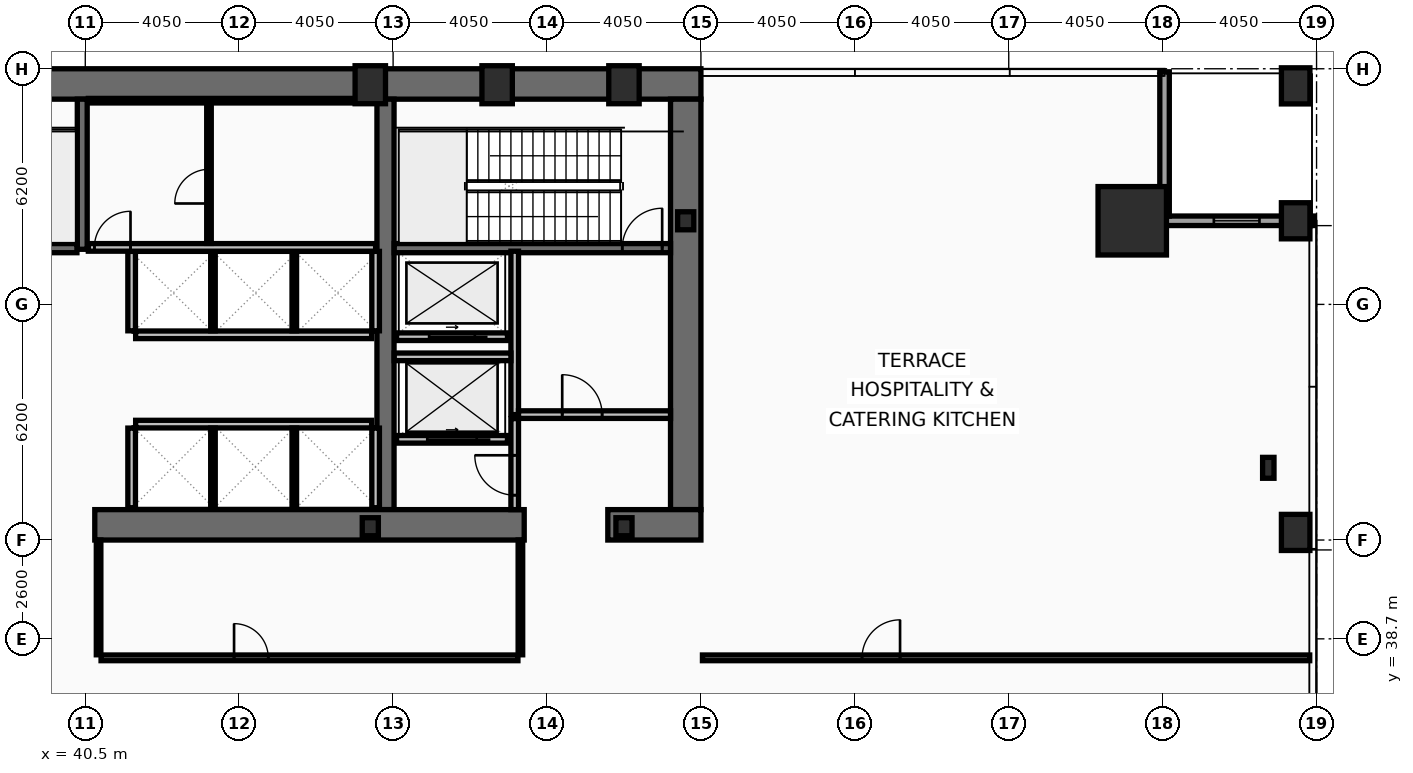
"""IFC4 building model, lengths in metres.
Left out: names, types, materials, properties, quantities, classifications, styles, units other than length and angle.
Written with IfcOpenShell. Run it as: python <this file> out.ifc"""

import sys

from ifc_helpers import new_model, si_unit, direction, frame, frame_2d, origin, origin_2d, place, context, subcontext, project, spatial, rectangle, hollow_rectangle, i_section, extrude, element, fill, save


model = new_model("IFC4")
c1 = context("Model", 3, precision=1e-05, world=origin(), true_north=direction((0.0, 1.0)))
c2 = subcontext(c1, "Body", "Model", "MODEL_VIEW")
j1 = project(units=[si_unit("LENGTHUNIT", "METRE"), si_unit("PLANEANGLEUNIT", "RADIAN")], contexts=[c1])
p1 = place(None, origin())
s1 = spatial("IfcSite", under=j1, at=p1, CompositionType="ELEMENT")
p2 = place(p1, origin())
s2 = spatial("IfcBuilding", under=s1, at=p2, CompositionType="ELEMENT")
p3 = place(p2, frame((0.0, 0.0, 10.4)))
s3 = spatial("IfcBuildingStorey", under=s2, at=p3, CompositionType="ELEMENT", Elevation=10.4)
p4 = place(p3, frame((16.2, 53.3, 0.0), z_axis=(0.0, 0.0, 1.0), x_axis=(1.0, 0.0, 0.0)))
e1 = element("IfcWall", 1, at=p4, inside=s3, PredefinedType="SHEAR", context=c2, shape_type="SweptSolid", body=[
    extrude(rectangle(XDim=40.5, YDim=0.8, at=frame_2d((20.25, 0.0))), origin(), (0.0, 0.0, 1.0), 4.8),
])
p5 = place(p3, frame((56.3, 52.9, 0.0), z_axis=(0.0, 0.0, 1.0), x_axis=(0.0, -1.0, 0.0)))
e2 = element("IfcWall", 2, at=p5, inside=s3, PredefinedType="SHEAR", context=c2, shape_type="SweptSolid", body=[
    extrude(rectangle(XDim=10.8, YDim=0.8, at=frame_2d((5.4, 0.0))), origin(), (0.0, 0.0, 1.0), 4.8),
])
p6 = place(p3, frame((48.4, 42.1, 0.0), z_axis=(0.0, 0.0, 1.0), x_axis=(0.0, 1.0, 0.0)))
e3 = element("IfcWall", 3, at=p6, inside=s3, PredefinedType="SHEAR", context=c2, shape_type="SweptSolid", body=[
    extrude(rectangle(XDim=10.8, YDim=0.45, at=frame_2d((5.4, 0.0))), origin(), (0.0, 0.0, 1.0), 4.8),
])
p7 = place(p3, frame((52.05, 41.7, 0.0), z_axis=(0.0, 0.0, 1.0), x_axis=(-1.0, 0.0, 0.0)))
e4 = element("IfcWall", 4, at=p7, inside=s3, PredefinedType="SHEAR", context=c2, shape_type="SweptSolid", body=[
    extrude(rectangle(XDim=11.3, YDim=0.8, at=frame_2d((5.65, 0.0))), origin(), (0.0, 0.0, 1.0), 4.8),
])
p8 = place(p3, frame((56.7, 41.7, 0.0), z_axis=(0.0, 0.0, 1.0), x_axis=(-1.0, 0.0, 0.0)))
e5 = element("IfcWall", 5, at=p8, inside=s3, PredefinedType="SHEAR", context=c2, shape_type="SweptSolid", body=[
    extrude(rectangle(XDim=2.45, YDim=0.8, at=frame_2d((1.225, 0.0))), origin(), (0.0, 0.0, 1.0), 4.8),
])
p9 = place(p3, frame((40.42, 48.95, 0.0), z_axis=(0.0, 0.0, 1.0), x_axis=(0.0, 1.0, 0.0)))
e6 = element("IfcWall", 6, at=p9, inside=s3, PredefinedType="SHEAR", context=c2, shape_type="SweptSolid", body=[
    extrude(rectangle(XDim=3.95, YDim=0.26, at=frame_2d((1.975, 0.0))), origin(), (0.0, 0.0, 1.0), 4.8),
])
p10 = place(p3, frame((48.63, 48.98, 0.0), z_axis=(0.0, 0.0, 1.0), x_axis=(1.0, 0.0, 0.0)))
e7 = element("IfcWall", 7, at=p10, inside=s3, PredefinedType="SHEAR", context=c2, shape_type="SweptSolid", body=[
    extrude(rectangle(XDim=7.27, YDim=0.24, at=frame_2d((3.635, 0.0))), origin(), (0.0, 0.0, 1.0), 4.8),
])
p11 = place(p10, frame((6.0, 0.0, 0.0)))
e8 = element("IfcOpeningElement", 8, at=p11, cuts=e7, PredefinedType="OPENING", context=c2, shape_type="SweptSolid", body=[
    extrude(rectangle(XDim=1.05, YDim=2.15, at=frame_2d((0.525, 1.075))), frame((0.0, 0.13, 0.0), z_axis=(0.0, -1.0, 0.0), x_axis=(1.0, 0.0, 0.0)), (0.0, 0.0, 1.0), 0.26),
])
p12 = place(p3, frame((32.72, 48.98, 0.0), z_axis=(0.0, 0.0, 1.0), x_axis=(1.0, 0.0, 0.0)))
e9 = element("IfcWall", 9, at=p12, inside=s3, PredefinedType="SHEAR", context=c2, shape_type="SweptSolid", body=[
    extrude(rectangle(XDim=7.56, YDim=0.24, at=frame_2d((3.78, 0.0))), origin(), (0.0, 0.0, 1.0), 4.8),
])
p13 = place(p12, frame((0.22, 0.0, 0.0)))
e10 = element("IfcOpeningElement", 10, at=p13, cuts=e9, PredefinedType="OPENING", context=c2, shape_type="SweptSolid", body=[
    extrude(rectangle(XDim=1.05, YDim=2.15, at=frame_2d((0.525, 1.075))), frame((0.0, 0.13, 0.0), z_axis=(0.0, -1.0, 0.0), x_axis=(1.0, 0.0, 0.0)), (0.0, 0.0, 1.0), 0.26),
])
p14 = place(p3, frame((68.05, 49.7, 0.0), z_axis=(0.0, 0.0, 1.0), x_axis=(1.0, 0.0, 0.0)))
e11 = element("IfcColumn", 11, at=p14, inside=s3, PredefinedType="COLUMN", context=c2, shape_type="SweptSolid", body=[
    extrude(hollow_rectangle(XDim=1.8, YDim=1.8, WallThickness=0.08, at=origin_2d()), origin(), (0.0, 0.0, 1.0), 5.0),
])
for number, where, z_axis, x_axis in (
    (12, (48.0, 53.28, 0.0), (0.0, 0.0, 1.0), (1.0, 0.0, 0.0)),
    (13, (51.337, 53.28, 0.0), (0.0, 0.0, 1.0), (1.0, 0.0, 0.0)),
    (14, (54.675, 53.28, 0.0), (0.0, 0.0, 1.0), (1.0, 0.0, 0.0)),
):
    element("IfcColumn", number, at=place(p3, frame(where, z_axis=z_axis, x_axis=x_axis)), inside=s3, PredefinedType="COLUMN", context=c2, shape_type="SweptSolid", body=[
        extrude(hollow_rectangle(XDim=0.8, YDim=1.0, WallThickness=0.055, at=origin_2d()), origin(), (0.0, 0.0, 1.0), 5.0),
    ])
p15 = place(p3, frame((71.63, 43.2, 0.0), z_axis=(0.0, 0.0, 1.0), x_axis=(1.0, 0.0, 0.0)))
e15 = element("IfcColumn", 15, at=p15, inside=s3, PredefinedType="COLUMN", context=c2, shape_type="SweptSolid", body=[
    extrude(i_section(OverallWidth=0.3, OverallDepth=0.55, WebThickness=0.015, FlangeThickness=0.029, at=origin_2d()), origin(), (0.0, 0.0, 1.0), 5.0),
])
for number, where, z_axis, x_axis in (
    (16, (56.3, 49.7, 0.0), (0.0, 0.0, 1.0), (1.0, 0.0, 0.0)),
    (17, (48.0, 41.65, 0.0), (0.0, 0.0, 1.0), (1.0, 0.0, 0.0)),
    (18, (54.675, 41.65, 0.0), (0.0, 0.0, 1.0), (1.0, 0.0, 0.0)),
):
    element("IfcColumn", number, at=place(p3, frame(where, z_axis=z_axis, x_axis=x_axis)), inside=s3, PredefinedType="COLUMN", context=c2, shape_type="SweptSolid", body=[
        extrude(i_section(OverallWidth=0.424, OverallDepth=0.474, WebThickness=0.048, FlangeThickness=0.077, at=origin_2d()), origin(), (0.0, 0.0, 1.0), 5.0),
    ])
for number, where, z_axis, x_axis in (
    (19, (72.35, 49.7, 0.0), (0.0, 0.0, 1.0), (1.0, 0.0, 0.0)),
    (20, (72.35, 53.25, 0.0), (0.0, 0.0, 1.0), (1.0, 0.0, 0.0)),
    (21, (72.35, 41.5, 0.0), (0.0, 0.0, 1.0), (1.0, 0.0, 0.0)),
):
    element("IfcColumn", number, at=place(p3, frame(where, z_axis=z_axis, x_axis=x_axis)), inside=s3, PredefinedType="PILASTER", context=c2, shape_type="SweptSolid", body=[
        extrude(rectangle(XDim=0.75, YDim=0.95, at=origin_2d()), origin(), (0.0, 0.0, 1.0), 5.0),
    ])
p16 = place(p3, frame((68.775, 49.7, 0.0), z_axis=(0.0, 0.0, 1.0), x_axis=(1.0, 0.0, 0.0)))
e22 = element("IfcWall", 22, at=p16, inside=s3, PredefinedType="SOLIDWALL", context=c2, shape_type="SweptSolid", body=[
    extrude(rectangle(XDim=4.045, YDim=0.25, at=frame_2d((2.022, 0.0))), origin(), (0.0, 0.0, 1.0), 4.14),
])
p17 = place(p16, frame((1.423, 0.0, 0.9)))
e23 = element("IfcOpeningElement", 23, at=p17, cuts=e22, PredefinedType="OPENING", context=c2, shape_type="SweptSolid", body=[
    extrude(rectangle(XDim=1.2, YDim=2.8, at=frame_2d((0.6, 1.4))), frame((0.0, 0.135, 0.0), z_axis=(0.0, -1.0, 0.0), x_axis=(1.0, 0.0, 0.0)), (0.0, 0.0, 1.0), 0.27),
])
p18 = place(p3, frame((68.9, 53.62, 0.0), z_axis=(0.0, 0.0, 1.0), x_axis=(0.0, -1.0, 0.0)))
e24 = element("IfcWall", 24, at=p18, inside=s3, PredefinedType="SOLIDWALL", context=c2, shape_type="SweptSolid", body=[
    extrude(rectangle(XDim=3.795, YDim=0.25, at=frame_2d((1.897, 0.0))), origin(), (0.0, 0.0, 1.0), 4.14),
])
p19 = place(p3, frame((51.61, 43.95, 0.0), z_axis=(0.0, 0.0, 1.0), x_axis=(-1.0, 0.0, 0.0)))
e25 = element("IfcWall", 25, at=p19, inside=s3, PredefinedType="PARTITIONING", context=c2, shape_type="SweptSolid", body=[
    extrude(rectangle(XDim=2.92, YDim=0.2, at=frame_2d((1.46, 0.0))), origin(), (0.0, 0.0, 1.0), 4.8),
])
p20 = place(p19, frame((0.81, 0.0, 0.0)))
e26 = element("IfcOpeningElement", 26, at=p20, cuts=e25, PredefinedType="OPENING", context=c2, shape_type="SweptSolid", body=[
    extrude(rectangle(XDim=1.3, YDim=2.18, at=frame_2d((0.65, 1.09))), frame((0.0, 0.11, 0.0), z_axis=(0.0, -1.0, 0.0), x_axis=(1.0, 0.0, 0.0)), (0.0, 0.0, 1.0), 0.22),
])
p21 = place(p3, frame((51.61, 46.65, 0.0), z_axis=(0.0, 0.0, 1.0), x_axis=(-1.0, 0.0, 0.0)))
e27 = element("IfcWall", 27, at=p21, inside=s3, PredefinedType="PARTITIONING", context=c2, shape_type="SweptSolid", body=[
    extrude(rectangle(XDim=2.92, YDim=0.2, at=frame_2d((1.46, 0.0))), origin(), (0.0, 0.0, 1.0), 4.8),
])
p22 = place(p21, frame((0.86, 0.0, 0.0)))
e28 = element("IfcOpeningElement", 28, at=p22, cuts=e27, PredefinedType="OPENING", context=c2, shape_type="SweptSolid", body=[
    extrude(rectangle(XDim=1.2, YDim=2.18, at=frame_2d((0.6, 1.09))), frame((0.0, 0.11, 0.0), z_axis=(0.0, -1.0, 0.0), x_axis=(1.0, 0.0, 0.0)), (0.0, 0.0, 1.0), 0.22),
])
p23 = place(p3, frame((51.8, 44.6, 0.0), z_axis=(0.0, 0.0, 1.0), x_axis=(0.0, 1.0, 0.0)))
e29 = element("IfcWall", 29, at=p23, inside=s3, PredefinedType="PARTITIONING", context=c2, shape_type="SweptSolid", body=[
    extrude(rectangle(XDim=4.3, YDim=0.2, at=frame_2d((2.15, 0.0))), origin(), (0.0, 0.0, 1.0), 4.8),
])
p24 = place(p3, frame((51.9, 44.6, 0.0), z_axis=(0.0, 0.0, 1.0), x_axis=(1.0, 0.0, 0.0)))
e30 = element("IfcWall", 30, at=p24, inside=s3, PredefinedType="PARTITIONING", context=c2, shape_type="SweptSolid", body=[
    extrude(rectangle(XDim=4.0, YDim=0.2, at=frame_2d((2.0, 0.0))), origin(), (0.0, 0.0, 1.0), 4.8),
])
p25 = place(p24, frame((1.15, 0.0, 0.0)))
e31 = element("IfcOpeningElement", 31, at=p25, cuts=e30, PredefinedType="OPENING", context=c2, shape_type="SweptSolid", body=[
    extrude(rectangle(XDim=1.05, YDim=2.15, at=frame_2d((0.525, 1.075))), frame((0.0, 0.11, 0.0), z_axis=(0.0, -1.0, 0.0), x_axis=(1.0, 0.0, 0.0)), (0.0, 0.0, 1.0), 0.22),
])
p26 = place(p3, frame((48.63, 46.12, 0.0), z_axis=(0.0, 0.0, 1.0), x_axis=(1.0, 0.0, 0.0)))
e32 = element("IfcWall", 32, at=p26, inside=s3, PredefinedType="PARTITIONING", context=c2, shape_type="SweptSolid", body=[
    extrude(rectangle(XDim=3.07, YDim=0.2, at=frame_2d((1.535, 0.0))), origin(), (0.0, 0.0, 1.0), 4.8),
])
p27 = place(p3, frame((51.8, 42.1, 0.0), z_axis=(0.0, 0.0, 1.0), x_axis=(0.0, 1.0, 0.0)))
e33 = element("IfcWall", 33, at=p27, inside=s3, PredefinedType="PARTITIONING", context=c2, shape_type="SweptSolid", body=[
    extrude(rectangle(XDim=2.395, YDim=0.2, at=frame_2d((1.198, 0.0))), origin(), (0.0, 0.0, 1.0), 4.8),
])
p28 = place(p27, frame((0.38, 0.0, 0.0)))
e34 = element("IfcOpeningElement", 34, at=p28, cuts=e33, PredefinedType="OPENING", context=c2, shape_type="SweptSolid", body=[
    extrude(rectangle(XDim=1.05, YDim=2.15, at=frame_2d((0.525, 1.075))), frame((0.0, 0.11, 0.0), z_axis=(0.0, -1.0, 0.0), x_axis=(1.0, 0.0, 0.0)), (0.0, 0.0, 1.0), 0.22),
])
p29 = place(p3, frame((41.825, 46.7, 0.0), z_axis=(0.0, 0.0, 1.0), x_axis=(1.0, 0.0, 0.0)))
e35 = element("IfcWall", 35, at=p29, inside=s3, PredefinedType="PARTITIONING", context=c2, shape_type="SweptSolid", body=[
    extrude(rectangle(XDim=6.21, YDim=0.2, at=frame_2d((3.105, 0.0))), origin(), (0.0, 0.0, 1.0), 4.8),
])
for number, where, z_axis, x_axis in (
    (36, (41.72, 46.805, 0.0), (0.0, 0.0, 1.0), (0.0, 1.0, 0.0)),
    (37, (48.14, 46.805, 0.0), (0.0, 0.0, 1.0), (0.0, 1.0, 0.0)),
):
    element("IfcWall", number, at=place(p3, frame(where, z_axis=z_axis, x_axis=x_axis)), inside=s3, PredefinedType="PARTITIONING", context=c2, shape_type="SweptSolid", body=[
        extrude(rectangle(XDim=2.09, YDim=0.2, at=frame_2d((1.045, 0.0))), origin(), (0.0, 0.0, 1.0), 4.8),
    ])
for number, where, z_axis, x_axis in (
    (38, (43.86, 46.805, 0.0), (0.0, 0.0, 1.0), (0.0, 1.0, 0.0)),
    (39, (46.0, 46.805, 0.0), (0.0, 0.0, 1.0), (0.0, 1.0, 0.0)),
):
    element("IfcWall", number, at=place(p3, frame(where, z_axis=z_axis, x_axis=x_axis)), inside=s3, PredefinedType="PARTITIONING", context=c2, shape_type="SweptSolid", body=[
        extrude(rectangle(XDim=2.09, YDim=0.12, at=frame_2d((1.045, 0.0))), origin(), (0.0, 0.0, 1.0), 4.8),
    ])
p30 = place(p3, frame((41.825, 44.35, 0.0), z_axis=(0.0, 0.0, 1.0), x_axis=(1.0, 0.0, 0.0)))
e40 = element("IfcWall", 40, at=p30, inside=s3, PredefinedType="PARTITIONING", context=c2, shape_type="SweptSolid", body=[
    extrude(rectangle(XDim=6.21, YDim=0.2, at=frame_2d((3.105, 0.0))), origin(), (0.0, 0.0, 1.0), 4.8),
])
for number, where, z_axis, x_axis in (
    (41, (41.72, 42.15, 0.0), (0.0, 0.0, 1.0), (0.0, 1.0, 0.0)),
    (42, (48.14, 42.15, 0.0), (0.0, 0.0, 1.0), (0.0, 1.0, 0.0)),
):
    element("IfcWall", number, at=place(p3, frame(where, z_axis=z_axis, x_axis=x_axis)), inside=s3, PredefinedType="PARTITIONING", context=c2, shape_type="SweptSolid", body=[
        extrude(rectangle(XDim=2.095, YDim=0.2, at=frame_2d((1.048, 0.0))), origin(), (0.0, 0.0, 1.0), 4.8),
    ])
for number, where, z_axis, x_axis in (
    (43, (43.86, 42.15, 0.0), (0.0, 0.0, 1.0), (0.0, 1.0, 0.0)),
    (44, (46.0, 42.15, 0.0), (0.0, 0.0, 1.0), (0.0, 1.0, 0.0)),
):
    element("IfcWall", number, at=place(p3, frame(where, z_axis=z_axis, x_axis=x_axis)), inside=s3, PredefinedType="PARTITIONING", context=c2, shape_type="SweptSolid", body=[
        extrude(rectangle(XDim=2.095, YDim=0.12, at=frame_2d((1.048, 0.0))), origin(), (0.0, 0.0, 1.0), 4.8),
    ])
p31 = place(p3, frame((40.58, 52.86, 0.0), z_axis=(0.0, 0.0, 1.0), x_axis=(1.0, 0.0, 0.0)))
e45 = element("IfcWall", 45, at=p31, inside=s3, PredefinedType="PARTITIONING", context=c2, shape_type="SweptSolid", body=[
    extrude(rectangle(XDim=7.56, YDim=0.12, at=frame_2d((3.78, 0.0))), origin(), (0.0, 0.0, 1.0), 4.8),
])
p32 = place(p3, frame((40.58, 49.0, 0.0), z_axis=(0.0, 0.0, 1.0), x_axis=(1.0, 0.0, 0.0)))
e46 = element("IfcWall", 46, at=p32, inside=s3, PredefinedType="PARTITIONING", context=c2, shape_type="SweptSolid", body=[
    extrude(rectangle(XDim=7.56, YDim=0.2, at=frame_2d((3.78, 0.0))), origin(), (0.0, 0.0, 1.0), 4.8),
])
p33 = place(p32, frame((0.16, 0.0, 0.0)))
e47 = element("IfcOpeningElement", 47, at=p33, cuts=e46, PredefinedType="OPENING", context=c2, shape_type="SweptSolid", body=[
    extrude(rectangle(XDim=0.95, YDim=2.1, at=frame_2d((0.475, 1.05))), frame((0.0, 0.11, 0.0), z_axis=(0.0, -1.0, 0.0), x_axis=(1.0, 0.0, 0.0)), (0.0, 0.0, 1.0), 0.22),
])
p34 = place(p3, frame((43.755, 49.105, 0.0), z_axis=(0.0, 0.0, 1.0), x_axis=(0.0, 1.0, 0.0)))
e48 = element("IfcWall", 48, at=p34, inside=s3, PredefinedType="PARTITIONING", context=c2, shape_type="SweptSolid", body=[
    extrude(rectangle(XDim=3.69, YDim=0.12, at=frame_2d((1.845, 0.0))), origin(), (0.0, 0.0, 1.0), 4.8),
])
p35 = place(p34, frame((1.05, 0.0, 0.0)))
e49 = element("IfcOpeningElement", 49, at=p35, cuts=e48, PredefinedType="OPENING", context=c2, shape_type="SweptSolid", body=[
    extrude(rectangle(XDim=0.9, YDim=2.05, at=frame_2d((0.45, 1.025))), frame((0.0, 0.07, 0.0), z_axis=(0.0, -1.0, 0.0), x_axis=(1.0, 0.0, 0.0)), (0.0, 0.0, 1.0), 0.14),
])
p36 = place(p3, frame((56.74, 38.2, 0.0), z_axis=(0.0, 0.0, 1.0), x_axis=(1.0, 0.0, 0.0)))
e50 = element("IfcWall", 50, at=p36, inside=s3, PredefinedType="PARTITIONING", context=c2, shape_type="SweptSolid", body=[
    extrude(rectangle(XDim=15.98, YDim=0.15, at=frame_2d((7.99, 0.0))), origin(), (0.0, 0.0, 1.0), 4.14),
])
p37 = place(p36, frame((4.2, 0.0, 0.0)))
e51 = element("IfcOpeningElement", 51, at=p37, cuts=e50, PredefinedType="OPENING", context=c2, shape_type="SweptSolid", body=[
    extrude(rectangle(XDim=1.0, YDim=2.05, at=frame_2d((0.5, 1.025))), frame((0.0, 0.085, 0.0), z_axis=(0.0, -1.0, 0.0), x_axis=(1.0, 0.0, 0.0)), (0.0, 0.0, 1.0), 0.17),
])
for number, where, z_axis, x_axis in (
    (52, (40.85, 38.28, 0.0), (0.0, 0.0, 1.0), (0.0, 1.0, 0.0)),
    (53, (51.95, 38.28, 0.0), (0.0, 0.0, 1.0), (0.0, 1.0, 0.0)),
):
    element("IfcWall", number, at=place(p3, frame(where, z_axis=z_axis, x_axis=x_axis)), inside=s3, PredefinedType="PARTITIONING", context=c2, shape_type="SweptSolid", body=[
        extrude(rectangle(XDim=3.02, YDim=0.12, at=frame_2d((1.51, 0.0))), origin(), (0.0, 0.0, 1.0), 4.8),
    ])
p38 = place(p3, frame((40.915, 38.2, 0.0), z_axis=(0.0, 0.0, 1.0), x_axis=(1.0, 0.0, 0.0)))
e54 = element("IfcWall", 54, at=p38, inside=s3, PredefinedType="PARTITIONING", context=c2, shape_type="SweptSolid", body=[
    extrude(rectangle(XDim=10.97, YDim=0.15, at=frame_2d((5.485, 0.0))), origin(), (0.0, 0.0, 1.0), 3.89),
])
p39 = place(p38, frame((3.5, 0.0, 0.0)))
e55 = element("IfcOpeningElement", 55, at=p39, cuts=e54, PredefinedType="OPENING", context=c2, shape_type="SweptSolid", body=[
    extrude(rectangle(XDim=0.9, YDim=2.05, at=frame_2d((0.45, 1.025))), frame((0.0, 0.085, 0.0), z_axis=(0.0, -1.0, 0.0), x_axis=(1.0, 0.0, 0.0)), (0.0, 0.0, 1.0), 0.17),
])
p40 = place(p17, origin())
e56 = element("IfcWindow", 56, at=p40, inside=s3, PartitioningType="SINGLE_PANEL", PredefinedType="WINDOW", context=c2, shape_type="SweptSolid", body=[
    extrude(rectangle(XDim=1.2, YDim=2.8, at=frame_2d((0.6, 1.4))), frame((0.0, 0.03, 0.0), z_axis=(0.0, -1.0, 0.0), x_axis=(1.0, 0.0, 0.0)), (0.0, 0.0, 1.0), 0.06),
])
fill(e23, e56)
p41 = place(p11, origin())
e57 = element("IfcDoor", 57, at=p41, inside=s3, OperationType="SINGLE_SWING_RIGHT", PredefinedType="DOOR", context=c2, shape_type="SweptSolid", body=[
    extrude(rectangle(XDim=1.05, YDim=2.15, at=frame_2d((0.525, 1.075))), frame((0.0, 0.025, 0.0), z_axis=(0.0, -1.0, 0.0), x_axis=(1.0, 0.0, 0.0)), (0.0, 0.0, 1.0), 0.05),
])
fill(e8, e57)
p42 = place(p20, origin())
e58 = element("IfcDoor", 58, at=p42, inside=s3, OperationType="SLIDING_TO_LEFT", PredefinedType="DOOR", context=c2, shape_type="SweptSolid", body=[
    extrude(rectangle(XDim=1.3, YDim=2.18, at=frame_2d((0.65, 1.09))), frame((0.0, 0.025, 0.0), z_axis=(0.0, -1.0, 0.0), x_axis=(1.0, 0.0, 0.0)), (0.0, 0.0, 1.0), 0.05),
])
fill(e26, e58)
p43 = place(p22, origin())
e59 = element("IfcDoor", 59, at=p43, inside=s3, OperationType="SLIDING_TO_LEFT", PredefinedType="DOOR", context=c2, shape_type="SweptSolid", body=[
    extrude(rectangle(XDim=1.2, YDim=2.18, at=frame_2d((0.6, 1.09))), frame((0.0, 0.025, 0.0), z_axis=(0.0, -1.0, 0.0), x_axis=(1.0, 0.0, 0.0)), (0.0, 0.0, 1.0), 0.05),
])
fill(e28, e59)
p44 = place(p25, origin())
e60 = element("IfcDoor", 60, at=p44, inside=s3, OperationType="SINGLE_SWING_LEFT", PredefinedType="DOOR", context=c2, shape_type="SweptSolid", body=[
    extrude(rectangle(XDim=1.05, YDim=2.15, at=frame_2d((0.525, 1.075))), frame((0.0, 0.025, 0.0), z_axis=(0.0, -1.0, 0.0), x_axis=(1.0, 0.0, 0.0)), (0.0, 0.0, 1.0), 0.05),
])
fill(e31, e60)
p45 = place(p28, origin())
e61 = element("IfcDoor", 61, at=p45, inside=s3, OperationType="SINGLE_SWING_RIGHT", PredefinedType="DOOR", context=c2, shape_type="SweptSolid", body=[
    extrude(rectangle(XDim=1.05, YDim=2.15, at=frame_2d((0.525, 1.075))), frame((0.0, 0.025, 0.0), z_axis=(0.0, -1.0, 0.0), x_axis=(1.0, 0.0, 0.0)), (0.0, 0.0, 1.0), 0.05),
])
fill(e34, e61)
p46 = place(p33, origin())
e62 = element("IfcDoor", 62, at=p46, inside=s3, OperationType="SINGLE_SWING_RIGHT", PredefinedType="DOOR", context=c2, shape_type="SweptSolid", body=[
    extrude(rectangle(XDim=0.95, YDim=2.1, at=frame_2d((0.475, 1.05))), frame((0.0, 0.025, 0.0), z_axis=(0.0, -1.0, 0.0), x_axis=(1.0, 0.0, 0.0)), (0.0, 0.0, 1.0), 0.05),
])
fill(e47, e62)
p47 = place(p35, origin())
e63 = element("IfcDoor", 63, at=p47, inside=s3, OperationType="SINGLE_SWING_LEFT", PredefinedType="DOOR", context=c2, shape_type="SweptSolid", body=[
    extrude(rectangle(XDim=0.9, YDim=2.05, at=frame_2d((0.45, 1.025))), frame((0.0, 0.025, 0.0), z_axis=(0.0, -1.0, 0.0), x_axis=(1.0, 0.0, 0.0)), (0.0, 0.0, 1.0), 0.05),
])
fill(e49, e63)
p48 = place(p37, origin())
e64 = element("IfcDoor", 64, at=p48, inside=s3, OperationType="SINGLE_SWING_RIGHT", PredefinedType="DOOR", context=c2, shape_type="SweptSolid", body=[
    extrude(rectangle(XDim=1.0, YDim=2.05, at=frame_2d((0.5, 1.025))), frame((0.0, 0.025, 0.0), z_axis=(0.0, -1.0, 0.0), x_axis=(1.0, 0.0, 0.0)), (0.0, 0.0, 1.0), 0.05),
])
fill(e51, e64)
p49 = place(p39, origin())
e65 = element("IfcDoor", 65, at=p49, inside=s3, OperationType="SINGLE_SWING_LEFT", PredefinedType="DOOR", context=c2, shape_type="SweptSolid", body=[
    extrude(rectangle(XDim=0.9, YDim=2.05, at=frame_2d((0.45, 1.025))), frame((0.0, 0.025, 0.0), z_axis=(0.0, -1.0, 0.0), x_axis=(1.0, 0.0, 0.0)), (0.0, 0.0, 1.0), 0.05),
])
fill(e55, e65)
save(model, sys.argv[1])
